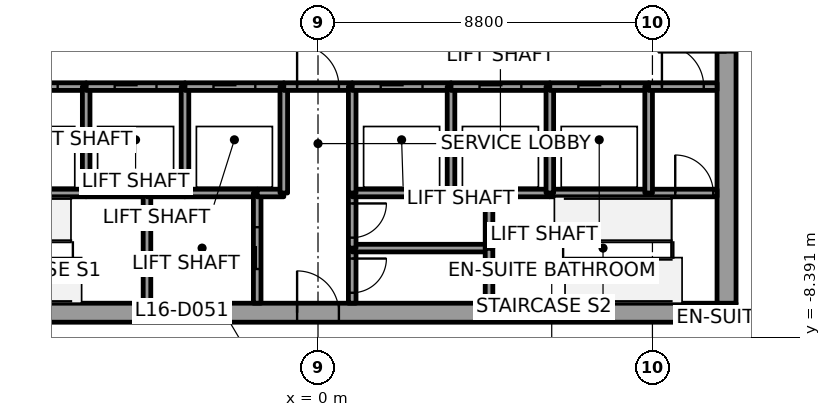
"""IFC4 building model, lengths in metres.
Left out: names, types, materials, properties, quantities, classifications, styles, units other than length and angle.
Written with IfcOpenShell. Run it as: python <this file> out.ifc"""

import sys

from ifc_helpers import new_model, si_unit, direction, frame, frame_2d, origin, place, context, subcontext, project, spatial, rectangle, extrude, element, fill, save


model = new_model("IFC4")
c1 = context("Model", 3, precision=1e-05, world=origin(), true_north=direction((0.0, 1.0)))
c2 = subcontext(c1, "Body", "Model", "MODEL_VIEW")
j1 = project(units=[si_unit("LENGTHUNIT", "METRE"), si_unit("PLANEANGLEUNIT", "RADIAN")], contexts=[c1])
p1 = place(None, origin())
s1 = spatial("IfcSite", under=j1, at=p1, CompositionType="ELEMENT")
p2 = place(p1, origin())
s2 = spatial("IfcBuilding", under=s1, at=p2, CompositionType="ELEMENT")
p3 = place(p2, frame((0.0, 0.0, 81.3)))
s3 = spatial("IfcBuildingStorey", under=s2, at=p3, CompositionType="ELEMENT", Elevation=81.3)
p4 = place(p3, frame((-11.0, -7.75, 0.0), z_axis=(0.0, 0.0, 1.0), x_axis=(1.0, 0.0, 0.0)))
e1 = element("IfcWall", 1, at=p4, inside=s3, PredefinedType="SHEAR", context=c2, shape_type="SweptSolid", body=[
    extrude(rectangle(XDim=22.0, YDim=0.5, at=frame_2d((11.0, 0.0))), origin(), (0.0, 0.0, 1.0), 3.7),
])
p5 = place(p4, frame((10.45, 0.0, 0.0)))
e2 = element("IfcOpeningElement", 2, at=p5, cuts=e1, PredefinedType="OPENING", context=c2, shape_type="SweptSolid", body=[
    extrude(rectangle(XDim=1.1, YDim=2.1, at=frame_2d((0.55, 1.05))), frame((0.0, 0.25, 0.0), z_axis=(0.0, -1.0, 0.0), x_axis=(1.0, 0.0, 0.0)), (0.0, 0.0, 1.0), 0.5),
])
p6 = place(p3, frame((10.75, -7.5, 0.0), z_axis=(0.0, 0.0, 1.0), x_axis=(0.0, 1.0, 0.0)))
e3 = element("IfcWall", 3, at=p6, inside=s3, PredefinedType="SHEAR", context=c2, shape_type="SweptSolid", body=[
    extrude(rectangle(XDim=15.0, YDim=0.5, at=frame_2d((7.5, 0.0))), origin(), (0.0, 0.0, 1.0), 3.7),
])
p7 = place(p6, frame((6.6, 0.0, 0.0)))
e4 = element("IfcOpeningElement", 4, at=p7, cuts=e3, PredefinedType="OPENING", context=c2, shape_type="SweptSolid", body=[
    extrude(rectangle(XDim=1.8, YDim=2.1, at=frame_2d((0.9, 1.05))), frame((0.0, 0.25, 0.0), z_axis=(0.0, -1.0, 0.0), x_axis=(1.0, 0.0, 0.0)), (0.0, 0.0, 1.0), 0.5),
])
p8 = place(p3, frame((-8.7, -4.6, 0.0), z_axis=(0.0, 0.0, 1.0), x_axis=(1.0, 0.0, 0.0)))
e5 = element("IfcWall", 5, at=p8, inside=s3, PredefinedType="SOLIDWALL", context=c2, shape_type="SweptSolid", body=[
    extrude(rectangle(XDim=2.6, YDim=0.2, at=frame_2d((1.3, 0.0))), origin(), (0.0, 0.0, 1.0), 3.55),
])
p9 = place(p3, frame((-8.7, -1.8, 0.0), z_axis=(0.0, 0.0, 1.0), x_axis=(1.0, 0.0, 0.0)))
e6 = element("IfcWall", 6, at=p9, inside=s3, PredefinedType="SOLIDWALL", context=c2, shape_type="SweptSolid", body=[
    extrude(rectangle(XDim=2.6, YDim=0.2, at=frame_2d((1.3, 0.0))), origin(), (0.0, 0.0, 1.0), 3.55),
])
p10 = place(p9, frame((0.75, 0.0, 0.0)))
e7 = element("IfcOpeningElement", 7, at=p10, cuts=e6, PredefinedType="OPENING", context=c2, shape_type="SweptSolid", body=[
    extrude(rectangle(XDim=1.1, YDim=2.1, at=frame_2d((0.55, 1.05))), frame((0.0, 0.1, 0.0), z_axis=(0.0, -1.0, 0.0), x_axis=(1.0, 0.0, 0.0)), (0.0, 0.0, 1.0), 0.2),
])
p11 = place(p3, frame((-6.1, -4.6, 0.0), z_axis=(0.0, 0.0, 1.0), x_axis=(1.0, 0.0, 0.0)))
e8 = element("IfcWall", 8, at=p11, inside=s3, PredefinedType="SOLIDWALL", context=c2, shape_type="SweptSolid", body=[
    extrude(rectangle(XDim=1.6, YDim=0.2, at=frame_2d((0.8, 0.0))), origin(), (0.0, 0.0, 1.0), 3.55),
])
p12 = place(p3, frame((-6.1, -4.6, 0.0), z_axis=(0.0, 0.0, 1.0), x_axis=(0.0, 1.0, 0.0)))
e9 = element("IfcWall", 9, at=p12, inside=s3, PredefinedType="SOLIDWALL", context=c2, shape_type="SweptSolid", body=[
    extrude(rectangle(XDim=2.8, YDim=0.2, at=frame_2d((1.4, 0.0))), origin(), (0.0, 0.0, 1.0), 3.55),
])
p13 = place(p3, frame((-6.1, -1.8, 0.0), z_axis=(0.0, 0.0, 1.0), x_axis=(1.0, 0.0, 0.0)))
e10 = element("IfcWall", 10, at=p13, inside=s3, PredefinedType="SOLIDWALL", context=c2, shape_type="SweptSolid", body=[
    extrude(rectangle(XDim=2.6, YDim=0.2, at=frame_2d((1.3, 0.0))), origin(), (0.0, 0.0, 1.0), 3.55),
])
p14 = place(p13, frame((0.75, 0.0, 0.0)))
e11 = element("IfcOpeningElement", 11, at=p14, cuts=e10, PredefinedType="OPENING", context=c2, shape_type="SweptSolid", body=[
    extrude(rectangle(XDim=1.1, YDim=2.1, at=frame_2d((0.55, 1.05))), frame((0.0, 0.1, 0.0), z_axis=(0.0, -1.0, 0.0), x_axis=(1.0, 0.0, 0.0)), (0.0, 0.0, 1.0), 0.2),
])
p15 = place(p3, frame((-4.5, -4.6, 0.0), z_axis=(0.0, 0.0, 1.0), x_axis=(0.0, -1.0, 0.0)))
e12 = element("IfcWall", 12, at=p15, inside=s3, PredefinedType="SOLIDWALL", context=c2, shape_type="SweptSolid", body=[
    extrude(rectangle(XDim=2.9, YDim=0.2, at=frame_2d((1.45, 0.0))), origin(), (0.0, 0.0, 1.0), 3.55),
])
p16 = place(p3, frame((-4.5, -4.6, 0.0), z_axis=(0.0, 0.0, 1.0), x_axis=(1.0, 0.0, 0.0)))
e13 = element("IfcWall", 13, at=p16, inside=s3, PredefinedType="SOLIDWALL", context=c2, shape_type="SweptSolid", body=[
    extrude(rectangle(XDim=1.0, YDim=0.2, at=frame_2d((0.5, 0.0))), origin(), (0.0, 0.0, 1.0), 3.55),
])
p17 = place(p3, frame((-3.5, -4.6, 0.0), z_axis=(0.0, 0.0, 1.0), x_axis=(1.0, 0.0, 0.0)))
e14 = element("IfcWall", 14, at=p17, inside=s3, PredefinedType="SOLIDWALL", context=c2, shape_type="SweptSolid", body=[
    extrude(rectangle(XDim=1.9, YDim=0.2, at=frame_2d((0.95, 0.0))), origin(), (0.0, 0.0, 1.0), 3.55),
])
p18 = place(p3, frame((-3.5, -4.6, 0.0), z_axis=(0.0, 0.0, 1.0), x_axis=(0.0, 1.0, 0.0)))
e15 = element("IfcWall", 15, at=p18, inside=s3, PredefinedType="SOLIDWALL", context=c2, shape_type="SweptSolid", body=[
    extrude(rectangle(XDim=2.8, YDim=0.2, at=frame_2d((1.4, 0.0))), origin(), (0.0, 0.0, 1.0), 3.55),
])
p19 = place(p3, frame((-3.5, -1.8, 0.0), z_axis=(0.0, 0.0, 1.0), x_axis=(1.0, 0.0, 0.0)))
e16 = element("IfcWall", 16, at=p19, inside=s3, PredefinedType="SOLIDWALL", context=c2, shape_type="SweptSolid", body=[
    extrude(rectangle(XDim=2.6, YDim=0.2, at=frame_2d((1.3, 0.0))), origin(), (0.0, 0.0, 1.0), 3.55),
])
p20 = place(p19, frame((0.75, 0.0, 0.0)))
e17 = element("IfcOpeningElement", 17, at=p20, cuts=e16, PredefinedType="OPENING", context=c2, shape_type="SweptSolid", body=[
    extrude(rectangle(XDim=1.1, YDim=2.1, at=frame_2d((0.55, 1.05))), frame((0.0, 0.1, 0.0), z_axis=(0.0, -1.0, 0.0), x_axis=(1.0, 0.0, 0.0)), (0.0, 0.0, 1.0), 0.2),
])
p21 = place(p3, frame((-1.6, -7.5, 0.0), z_axis=(0.0, 0.0, 1.0), x_axis=(0.0, 1.0, 0.0)))
e18 = element("IfcWall", 18, at=p21, inside=s3, PredefinedType="SOLIDWALL", context=c2, shape_type="SweptSolid", body=[
    extrude(rectangle(XDim=2.9, YDim=0.2, at=frame_2d((1.45, 0.0))), origin(), (0.0, 0.0, 1.0), 3.55),
])
p22 = place(p21, frame((0.9, 0.0, 0.0)))
e19 = element("IfcOpeningElement", 19, at=p22, cuts=e18, PredefinedType="OPENING", context=c2, shape_type="SweptSolid", body=[
    extrude(rectangle(XDim=1.1, YDim=2.1, at=frame_2d((0.55, 1.05))), frame((0.0, 0.1, 0.0), z_axis=(0.0, -1.0, 0.0), x_axis=(1.0, 0.0, 0.0)), (0.0, 0.0, 1.0), 0.2),
])
p23 = place(p3, frame((-1.6, -4.6, 0.0), z_axis=(0.0, 0.0, 1.0), x_axis=(1.0, 0.0, 0.0)))
e20 = element("IfcWall", 20, at=p23, inside=s3, PredefinedType="SOLIDWALL", context=c2, shape_type="SweptSolid", body=[
    extrude(rectangle(XDim=0.7, YDim=0.2, at=frame_2d((0.35, 0.0))), origin(), (0.0, 0.0, 1.0), 3.55),
])
p24 = place(p3, frame((-0.9, -4.6, 0.0), z_axis=(0.0, 0.0, 1.0), x_axis=(0.0, 1.0, 0.0)))
e21 = element("IfcWall", 21, at=p24, inside=s3, PredefinedType="SOLIDWALL", context=c2, shape_type="SweptSolid", body=[
    extrude(rectangle(XDim=2.8, YDim=0.2, at=frame_2d((1.4, 0.0))), origin(), (0.0, 0.0, 1.0), 3.55),
])
p25 = place(p3, frame((-0.9, -1.8, 0.0), z_axis=(0.0, 0.0, 1.0), x_axis=(1.0, 0.0, 0.0)))
e22 = element("IfcWall", 22, at=p25, inside=s3, PredefinedType="SOLIDWALL", context=c2, shape_type="SweptSolid", body=[
    extrude(rectangle(XDim=1.8, YDim=0.2, at=frame_2d((0.9, 0.0))), origin(), (0.0, 0.0, 1.0), 3.55),
])
p26 = place(p25, frame((0.35, 0.0, 0.0)))
e23 = element("IfcOpeningElement", 23, at=p26, cuts=e22, PredefinedType="OPENING", context=c2, shape_type="SweptSolid", body=[
    extrude(rectangle(XDim=1.1, YDim=2.1, at=frame_2d((0.55, 1.05))), frame((0.0, 0.1, 0.0), z_axis=(0.0, -1.0, 0.0), x_axis=(1.0, 0.0, 0.0)), (0.0, 0.0, 1.0), 0.2),
])
p27 = place(p3, frame((0.9, -6.05, 0.0), z_axis=(0.0, 0.0, 1.0), x_axis=(0.0, -1.0, 0.0)))
e24 = element("IfcWall", 24, at=p27, inside=s3, PredefinedType="SOLIDWALL", context=c2, shape_type="SweptSolid", body=[
    extrude(rectangle(XDim=1.45, YDim=0.2, at=frame_2d((0.725, 0.0))), origin(), (0.0, 0.0, 1.0), 3.55),
])
p28 = place(p27, frame((0.275, 0.0, 0.0)))
e25 = element("IfcOpeningElement", 25, at=p28, cuts=e24, PredefinedType="OPENING", context=c2, shape_type="SweptSolid", body=[
    extrude(rectangle(XDim=0.9, YDim=2.1, at=frame_2d((0.45, 1.05))), frame((0.0, 0.1, 0.0), z_axis=(0.0, -1.0, 0.0), x_axis=(1.0, 0.0, 0.0)), (0.0, 0.0, 1.0), 0.2),
])
p29 = place(p3, frame((4.5, -6.05, 0.0), z_axis=(0.0, 0.0, 1.0), x_axis=(-1.0, 0.0, 0.0)))
e26 = element("IfcWall", 26, at=p29, inside=s3, PredefinedType="SOLIDWALL", context=c2, shape_type="SweptSolid", body=[
    extrude(rectangle(XDim=3.6, YDim=0.2, at=frame_2d((1.8, 0.0))), origin(), (0.0, 0.0, 1.0), 3.55),
])
p30 = place(p3, frame((0.9, -4.6, 0.0), z_axis=(0.0, 0.0, 1.0), x_axis=(0.0, -1.0, 0.0)))
e27 = element("IfcWall", 27, at=p30, inside=s3, PredefinedType="SOLIDWALL", context=c2, shape_type="SweptSolid", body=[
    extrude(rectangle(XDim=1.45, YDim=0.2, at=frame_2d((0.725, 0.0))), origin(), (0.0, 0.0, 1.0), 3.55),
])
p31 = place(p30, frame((0.275, 0.0, 0.0)))
e28 = element("IfcOpeningElement", 28, at=p31, cuts=e27, PredefinedType="OPENING", context=c2, shape_type="SweptSolid", body=[
    extrude(rectangle(XDim=0.9, YDim=2.1, at=frame_2d((0.45, 1.05))), frame((0.0, 0.1, 0.0), z_axis=(0.0, -1.0, 0.0), x_axis=(1.0, 0.0, 0.0)), (0.0, 0.0, 1.0), 0.2),
])
p32 = place(p3, frame((3.5, -4.6, 0.0), z_axis=(0.0, 0.0, 1.0), x_axis=(-1.0, 0.0, 0.0)))
e29 = element("IfcWall", 29, at=p32, inside=s3, PredefinedType="SOLIDWALL", context=c2, shape_type="SweptSolid", body=[
    extrude(rectangle(XDim=2.6, YDim=0.2, at=frame_2d((1.3, 0.0))), origin(), (0.0, 0.0, 1.0), 3.55),
])
p33 = place(p3, frame((0.9, -1.8, 0.0), z_axis=(0.0, 0.0, 1.0), x_axis=(0.0, -1.0, 0.0)))
e30 = element("IfcWall", 30, at=p33, inside=s3, PredefinedType="SOLIDWALL", context=c2, shape_type="SweptSolid", body=[
    extrude(rectangle(XDim=2.8, YDim=0.2, at=frame_2d((1.4, 0.0))), origin(), (0.0, 0.0, 1.0), 3.55),
])
p34 = place(p3, frame((0.9, -1.8, 0.0), z_axis=(0.0, 0.0, 1.0), x_axis=(1.0, 0.0, 0.0)))
e31 = element("IfcWall", 31, at=p34, inside=s3, PredefinedType="SOLIDWALL", context=c2, shape_type="SweptSolid", body=[
    extrude(rectangle(XDim=2.6, YDim=0.2, at=frame_2d((1.3, 0.0))), origin(), (0.0, 0.0, 1.0), 3.55),
])
p35 = place(p34, frame((0.75, 0.0, 0.0)))
e32 = element("IfcOpeningElement", 32, at=p35, cuts=e31, PredefinedType="OPENING", context=c2, shape_type="SweptSolid", body=[
    extrude(rectangle(XDim=1.1, YDim=2.1, at=frame_2d((0.55, 1.05))), frame((0.0, 0.1, 0.0), z_axis=(0.0, -1.0, 0.0), x_axis=(1.0, 0.0, 0.0)), (0.0, 0.0, 1.0), 0.2),
])
p36 = place(p3, frame((4.5, -4.6, 0.0), z_axis=(0.0, 0.0, 1.0), x_axis=(-1.0, 0.0, 0.0)))
e33 = element("IfcWall", 33, at=p36, inside=s3, PredefinedType="SOLIDWALL", context=c2, shape_type="SweptSolid", body=[
    extrude(rectangle(XDim=1.0, YDim=0.2, at=frame_2d((0.5, 0.0))), origin(), (0.0, 0.0, 1.0), 3.55),
])
p37 = place(p3, frame((3.5, -4.6, 0.0), z_axis=(0.0, 0.0, 1.0), x_axis=(0.0, 1.0, 0.0)))
e34 = element("IfcWall", 34, at=p37, inside=s3, PredefinedType="SOLIDWALL", context=c2, shape_type="SweptSolid", body=[
    extrude(rectangle(XDim=2.8, YDim=0.2, at=frame_2d((1.4, 0.0))), origin(), (0.0, 0.0, 1.0), 3.55),
])
p38 = place(p3, frame((3.5, -1.8, 0.0), z_axis=(0.0, 0.0, 1.0), x_axis=(1.0, 0.0, 0.0)))
e35 = element("IfcWall", 35, at=p38, inside=s3, PredefinedType="SOLIDWALL", context=c2, shape_type="SweptSolid", body=[
    extrude(rectangle(XDim=2.6, YDim=0.2, at=frame_2d((1.3, 0.0))), origin(), (0.0, 0.0, 1.0), 3.55),
])
p39 = place(p38, frame((0.75, 0.0, 0.0)))
e36 = element("IfcOpeningElement", 36, at=p39, cuts=e35, PredefinedType="OPENING", context=c2, shape_type="SweptSolid", body=[
    extrude(rectangle(XDim=1.1, YDim=2.1, at=frame_2d((0.55, 1.05))), frame((0.0, 0.1, 0.0), z_axis=(0.0, -1.0, 0.0), x_axis=(1.0, 0.0, 0.0)), (0.0, 0.0, 1.0), 0.2),
])
for number, where, z_axis, x_axis in (
    (37, (4.5, -7.5, 0.0), (0.0, 0.0, 1.0), (0.0, 1.0, 0.0)),
    (38, (4.5, -6.05, 0.0), (0.0, 0.0, 1.0), (0.0, 1.0, 0.0)),
):
    element("IfcWall", number, at=place(p3, frame(where, z_axis=z_axis, x_axis=x_axis)), inside=s3, PredefinedType="SOLIDWALL", context=c2, shape_type="SweptSolid", body=[
        extrude(rectangle(XDim=1.45, YDim=0.2, at=frame_2d((0.725, 0.0))), origin(), (0.0, 0.0, 1.0), 3.55),
    ])
p40 = place(p3, frame((4.5, -4.6, 0.0), z_axis=(0.0, 0.0, 1.0), x_axis=(1.0, 0.0, 0.0)))
e39 = element("IfcWall", 39, at=p40, inside=s3, PredefinedType="SOLIDWALL", context=c2, shape_type="SweptSolid", body=[
    extrude(rectangle(XDim=1.6, YDim=0.2, at=frame_2d((0.8, 0.0))), origin(), (0.0, 0.0, 1.0), 3.55),
])
p41 = place(p3, frame((6.1, -4.6, 0.0), z_axis=(0.0, 0.0, 1.0), x_axis=(1.0, 0.0, 0.0)))
e40 = element("IfcWall", 40, at=p41, inside=s3, PredefinedType="SOLIDWALL", context=c2, shape_type="SweptSolid", body=[
    extrude(rectangle(XDim=2.6, YDim=0.2, at=frame_2d((1.3, 0.0))), origin(), (0.0, 0.0, 1.0), 3.55),
])
p42 = place(p3, frame((6.1, -4.6, 0.0), z_axis=(0.0, 0.0, 1.0), x_axis=(0.0, 1.0, 0.0)))
e41 = element("IfcWall", 41, at=p42, inside=s3, PredefinedType="SOLIDWALL", context=c2, shape_type="SweptSolid", body=[
    extrude(rectangle(XDim=2.8, YDim=0.2, at=frame_2d((1.4, 0.0))), origin(), (0.0, 0.0, 1.0), 3.55),
])
p43 = place(p3, frame((6.1, -1.8, 0.0), z_axis=(0.0, 0.0, 1.0), x_axis=(1.0, 0.0, 0.0)))
e42 = element("IfcWall", 42, at=p43, inside=s3, PredefinedType="SOLIDWALL", context=c2, shape_type="SweptSolid", body=[
    extrude(rectangle(XDim=2.6, YDim=0.2, at=frame_2d((1.3, 0.0))), origin(), (0.0, 0.0, 1.0), 3.55),
])
p44 = place(p43, frame((0.75, 0.0, 0.0)))
e43 = element("IfcOpeningElement", 43, at=p44, cuts=e42, PredefinedType="OPENING", context=c2, shape_type="SweptSolid", body=[
    extrude(rectangle(XDim=1.1, YDim=2.1, at=frame_2d((0.55, 1.05))), frame((0.0, 0.1, 0.0), z_axis=(0.0, -1.0, 0.0), x_axis=(1.0, 0.0, 0.0)), (0.0, 0.0, 1.0), 0.2),
])
p45 = place(p3, frame((8.7, -4.6, 0.0), z_axis=(0.0, 0.0, 1.0), x_axis=(1.0, 0.0, 0.0)))
e44 = element("IfcWall", 44, at=p45, inside=s3, PredefinedType="SOLIDWALL", context=c2, shape_type="SweptSolid", body=[
    extrude(rectangle(XDim=1.8, YDim=0.2, at=frame_2d((0.9, 0.0))), origin(), (0.0, 0.0, 1.0), 3.55),
])
p46 = place(p45, frame((0.7, 0.0, 0.0)))
e45 = element("IfcOpeningElement", 45, at=p46, cuts=e44, PredefinedType="OPENING", context=c2, shape_type="SweptSolid", body=[
    extrude(rectangle(XDim=1.0, YDim=2.1, at=frame_2d((0.5, 1.05))), frame((0.0, 0.1, 0.0), z_axis=(0.0, -1.0, 0.0), x_axis=(1.0, 0.0, 0.0)), (0.0, 0.0, 1.0), 0.2),
])
p47 = place(p3, frame((8.7, -1.8, 0.0), z_axis=(0.0, 0.0, 1.0), x_axis=(0.0, -1.0, 0.0)))
e46 = element("IfcWall", 46, at=p47, inside=s3, PredefinedType="SOLIDWALL", context=c2, shape_type="SweptSolid", body=[
    extrude(rectangle(XDim=2.8, YDim=0.2, at=frame_2d((1.4, 0.0))), origin(), (0.0, 0.0, 1.0), 3.55),
])
p48 = place(p3, frame((8.7, -1.8, 0.0), z_axis=(0.0, 0.0, 1.0), x_axis=(1.0, 0.0, 0.0)))
e47 = element("IfcWall", 47, at=p48, inside=s3, PredefinedType="SOLIDWALL", context=c2, shape_type="SweptSolid", body=[
    extrude(rectangle(XDim=1.8, YDim=0.2, at=frame_2d((0.9, 0.0))), origin(), (0.0, 0.0, 1.0), 3.55),
])
p49 = place(p48, frame((0.35, 0.0, 0.0)))
e48 = element("IfcOpeningElement", 48, at=p49, cuts=e47, PredefinedType="OPENING", context=c2, shape_type="SweptSolid", body=[
    extrude(rectangle(XDim=1.1, YDim=2.1, at=frame_2d((0.55, 1.05))), frame((0.0, 0.1, 0.0), z_axis=(0.0, -1.0, 0.0), x_axis=(1.0, 0.0, 0.0)), (0.0, 0.0, 1.0), 0.2),
])
p50 = place(p10, origin())
e49 = element("IfcDoor", 49, at=p50, inside=s3, OperationType="SLIDING_TO_RIGHT", PredefinedType="DOOR", context=c2, shape_type="SweptSolid", body=[
    extrude(rectangle(XDim=1.1, YDim=2.1, at=frame_2d((0.55, 1.05))), frame((0.0, 0.025, 0.0), z_axis=(0.0, -1.0, 0.0), x_axis=(1.0, 0.0, 0.0)), (0.0, 0.0, 1.0), 0.05),
])
fill(e7, e49)
p51 = place(p14, origin())
e50 = element("IfcDoor", 50, at=p51, inside=s3, OperationType="SLIDING_TO_LEFT", PredefinedType="DOOR", context=c2, shape_type="SweptSolid", body=[
    extrude(rectangle(XDim=1.1, YDim=2.1, at=frame_2d((0.55, 1.05))), frame((0.0, 0.025, 0.0), z_axis=(0.0, -1.0, 0.0), x_axis=(1.0, 0.0, 0.0)), (0.0, 0.0, 1.0), 0.05),
])
fill(e11, e50)
p52 = place(p20, origin())
e51 = element("IfcDoor", 51, at=p52, inside=s3, OperationType="SLIDING_TO_LEFT", PredefinedType="DOOR", context=c2, shape_type="SweptSolid", body=[
    extrude(rectangle(XDim=1.1, YDim=2.1, at=frame_2d((0.55, 1.05))), frame((0.0, 0.025, 0.0), z_axis=(0.0, -1.0, 0.0), x_axis=(1.0, 0.0, 0.0)), (0.0, 0.0, 1.0), 0.05),
])
fill(e17, e51)
p53 = place(p35, origin())
e52 = element("IfcDoor", 52, at=p53, inside=s3, OperationType="SLIDING_TO_RIGHT", PredefinedType="DOOR", context=c2, shape_type="SweptSolid", body=[
    extrude(rectangle(XDim=1.1, YDim=2.1, at=frame_2d((0.55, 1.05))), frame((0.0, 0.025, 0.0), z_axis=(0.0, -1.0, 0.0), x_axis=(1.0, 0.0, 0.0)), (0.0, 0.0, 1.0), 0.05),
])
fill(e32, e52)
p54 = place(p39, origin())
e53 = element("IfcDoor", 53, at=p54, inside=s3, OperationType="SLIDING_TO_LEFT", PredefinedType="DOOR", context=c2, shape_type="SweptSolid", body=[
    extrude(rectangle(XDim=1.1, YDim=2.1, at=frame_2d((0.55, 1.05))), frame((0.0, 0.025, 0.0), z_axis=(0.0, -1.0, 0.0), x_axis=(1.0, 0.0, 0.0)), (0.0, 0.0, 1.0), 0.05),
])
fill(e36, e53)
p55 = place(p44, origin())
e54 = element("IfcDoor", 54, at=p55, inside=s3, OperationType="SLIDING_TO_RIGHT", PredefinedType="DOOR", context=c2, shape_type="SweptSolid", body=[
    extrude(rectangle(XDim=1.1, YDim=2.1, at=frame_2d((0.55, 1.05))), frame((0.0, 0.025, 0.0), z_axis=(0.0, -1.0, 0.0), x_axis=(1.0, 0.0, 0.0)), (0.0, 0.0, 1.0), 0.05),
])
fill(e43, e54)
p56 = place(p22, origin())
e55 = element("IfcDoor", 55, at=p56, inside=s3, OperationType="SLIDING_TO_RIGHT", PredefinedType="DOOR", context=c2, shape_type="SweptSolid", body=[
    extrude(rectangle(XDim=1.1, YDim=2.1, at=frame_2d((0.55, 1.05))), frame((0.0, 0.025, 0.0), z_axis=(0.0, -1.0, 0.0), x_axis=(1.0, 0.0, 0.0)), (0.0, 0.0, 1.0), 0.05),
])
fill(e19, e55)
p57 = place(p49, origin())
e56 = element("IfcDoor", 56, at=p57, inside=s3, OperationType="SINGLE_SWING_LEFT", PredefinedType="DOOR", context=c2, shape_type="SweptSolid", body=[
    extrude(rectangle(XDim=1.1, YDim=2.1, at=frame_2d((0.55, 1.05))), frame((0.0, 0.025, 0.0), z_axis=(0.0, -1.0, 0.0), x_axis=(1.0, 0.0, 0.0)), (0.0, 0.0, 1.0), 0.05),
])
fill(e48, e56)
p58 = place(p26, origin())
e57 = element("IfcDoor", 57, at=p58, inside=s3, OperationType="SINGLE_SWING_RIGHT", PredefinedType="DOOR", context=c2, shape_type="SweptSolid", body=[
    extrude(rectangle(XDim=1.1, YDim=2.1, at=frame_2d((0.55, 1.05))), frame((0.0, 0.025, 0.0), z_axis=(0.0, -1.0, 0.0), x_axis=(1.0, 0.0, 0.0)), (0.0, 0.0, 1.0), 0.05),
])
fill(e23, e57)
p59 = place(p46, origin())
e58 = element("IfcDoor", 58, at=p59, inside=s3, OperationType="SINGLE_SWING_RIGHT", PredefinedType="DOOR", context=c2, shape_type="SweptSolid", body=[
    extrude(rectangle(XDim=1.0, YDim=2.1, at=frame_2d((0.5, 1.05))), frame((0.0, 0.025, 0.0), z_axis=(0.0, -1.0, 0.0), x_axis=(1.0, 0.0, 0.0)), (0.0, 0.0, 1.0), 0.05),
])
fill(e45, e58)
p60 = place(p28, origin())
e59 = element("IfcDoor", 59, at=p60, inside=s3, OperationType="SINGLE_SWING_RIGHT", PredefinedType="DOOR", context=c2, shape_type="SweptSolid", body=[
    extrude(rectangle(XDim=0.9, YDim=2.1, at=frame_2d((0.45, 1.05))), frame((0.0, 0.025, 0.0), z_axis=(0.0, -1.0, 0.0), x_axis=(1.0, 0.0, 0.0)), (0.0, 0.0, 1.0), 0.05),
])
fill(e25, e59)
p61 = place(p31, origin())
e60 = element("IfcDoor", 60, at=p61, inside=s3, OperationType="SINGLE_SWING_RIGHT", PredefinedType="DOOR", context=c2, shape_type="SweptSolid", body=[
    extrude(rectangle(XDim=0.9, YDim=2.1, at=frame_2d((0.45, 1.05))), frame((0.0, 0.025, 0.0), z_axis=(0.0, -1.0, 0.0), x_axis=(1.0, 0.0, 0.0)), (0.0, 0.0, 1.0), 0.05),
])
fill(e28, e60)
p62 = place(p7, origin())
e61 = element("IfcDoor", 61, at=p62, inside=s3, OperationType="DOUBLE_DOOR_SINGLE_SWING", PredefinedType="DOOR", context=c2, shape_type="SweptSolid", body=[
    extrude(rectangle(XDim=1.8, YDim=2.1, at=frame_2d((0.9, 1.05))), frame((0.0, 0.025, 0.0), z_axis=(0.0, -1.0, 0.0), x_axis=(1.0, 0.0, 0.0)), (0.0, 0.0, 1.0), 0.05),
])
fill(e4, e61)
p63 = place(p5, origin())
e62 = element("IfcDoor", 62, at=p63, inside=s3, OperationType="SINGLE_SWING_LEFT", PredefinedType="DOOR", context=c2, shape_type="SweptSolid", body=[
    extrude(rectangle(XDim=1.1, YDim=2.1, at=frame_2d((0.55, 1.05))), frame((0.0, 0.025, 0.0), z_axis=(0.0, -1.0, 0.0), x_axis=(1.0, 0.0, 0.0)), (0.0, 0.0, 1.0), 0.05),
])
fill(e2, e62)
save(model, sys.argv[1])
